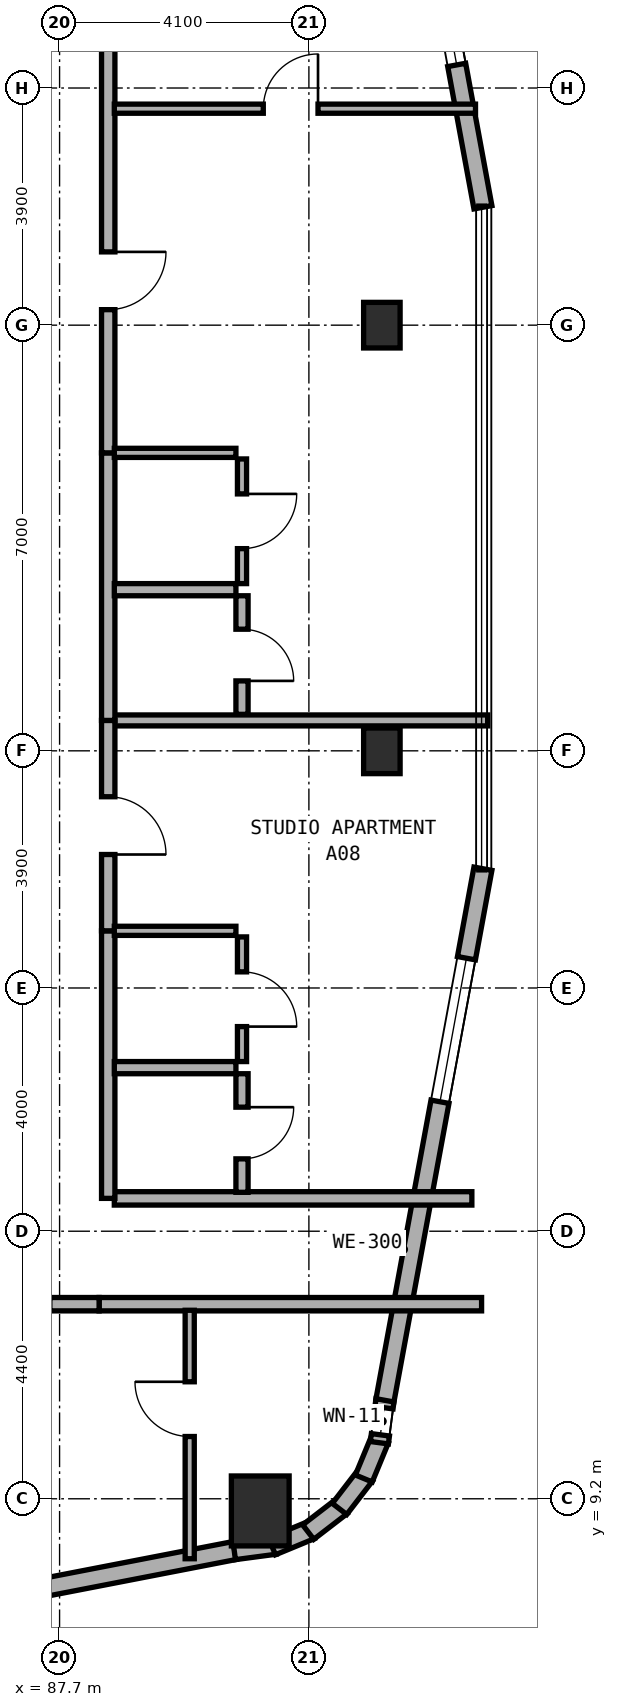
"""IFC4 building model, lengths in metres.
Left out: names, types, materials, properties, quantities, classifications, styles, units other than length and angle.
Written with IfcOpenShell. Run it as: python <this file> out.ifc"""

import sys

from ifc_helpers import new_model, si_unit, direction, frame, frame_2d, origin, origin_2d, place, context, subcontext, project, spatial, rectangle, extrude, element, fill, save


model = new_model("IFC4")
c1 = context("Model", 3, precision=1e-05, world=origin(), true_north=direction((0.0, 1.0)))
c2 = subcontext(c1, "Body", "Model", "MODEL_VIEW")
j1 = project(units=[si_unit("LENGTHUNIT", "METRE"), si_unit("PLANEANGLEUNIT", "RADIAN")], contexts=[c1])
p1 = place(None, origin())
s1 = spatial("IfcSite", under=j1, at=p1, CompositionType="ELEMENT")
p2 = place(p1, origin())
s2 = spatial("IfcBuilding", under=s1, at=p2, CompositionType="ELEMENT")
p3 = place(p2, frame((0.0, 0.0, 80.0)))
s3 = spatial("IfcBuildingStorey", under=s2, at=p3, CompositionType="ELEMENT", Elevation=80.0)
for number, where, z_axis, x_axis in (
    (1, (93.0, 21.5, 0.0), (0.0, 0.0, 1.0), (1.0, 0.0, 0.0)),
    (2, (93.0, 28.5, 0.0), (0.0, 0.0, 1.0), (1.0, 0.0, 0.0)),
):
    element("IfcColumn", number, at=place(p3, frame(where, z_axis=z_axis, x_axis=x_axis)), inside=s3, PredefinedType="COLUMN", context=c2, shape_type="SweptSolid", body=[
        extrude(rectangle(XDim=0.6, YDim=0.75, at=origin_2d()), origin(), (0.0, 0.0, 1.0), 3.5),
    ])
p4 = place(p3, frame((91.0, 9.0, 0.0), z_axis=(0.0, 0.0, 1.0), x_axis=(1.0, 0.0, 0.0)))
e3 = element("IfcColumn", 3, at=p4, inside=s3, PredefinedType="COLUMN", context=c2, shape_type="SweptSolid", body=[
    extrude(rectangle(XDim=0.95, YDim=1.15, at=origin_2d()), origin(), (0.0, 0.0, 1.0), 3.5),
])
p5 = place(p3, frame((82.286, 6.742, 0.0), z_axis=(0.0, 0.0, 1.0), x_axis=(0.981734775858, 0.190254644808, 0.0)))
e4 = element("IfcWall", 4, at=p5, inside=s3, PredefinedType="STANDARD", context=c2, shape_type="SweptSolid", body=[
    extrude(rectangle(XDim=8.448, YDim=0.3, at=frame_2d((4.224, 0.0))), origin(), (0.0, 0.0, 1.0), 3.25),
])
p6 = place(p5, frame((2.609, 0.0, 0.8)))
e5 = element("IfcOpeningElement", 5, at=p6, cuts=e4, PredefinedType="OPENING", context=c2, shape_type="SweptSolid", body=[
    extrude(rectangle(XDim=2.4, YDim=1.6, at=frame_2d((1.2, 0.8))), frame((0.0, 0.16, 0.0), z_axis=(0.0, -1.0, 0.0), x_axis=(1.0, 0.0, 0.0)), (0.0, 0.0, 1.0), 0.32),
])
p7 = place(p3, frame((90.572, 8.348, 0.0), z_axis=(0.0, 0.0, 1.0), x_axis=(0.991293937098, 0.131667498923, 0.0)))
e6 = element("IfcWall", 6, at=p7, inside=s3, PredefinedType="STANDARD", context=c2, shape_type="SweptSolid", body=[
    extrude(rectangle(XDim=0.677, YDim=0.3, at=frame_2d((0.338, 0.0))), origin(), (0.0, 0.0, 1.0), 3.25),
])
p8 = place(p3, frame((91.193, 8.418, 0.0), z_axis=(0.0, 0.0, 1.0), x_axis=(0.924042561464, 0.382289608286, 0.0)))
e7 = element("IfcWall", 7, at=p8, inside=s3, PredefinedType="STANDARD", context=c2, shape_type="SweptSolid", body=[
    extrude(rectangle(XDim=0.694, YDim=0.3, at=frame_2d((0.347, 0.0))), origin(), (0.0, 0.0, 1.0), 3.25),
])
for number, where, z_axis, x_axis in (
    (8, (91.789, 8.652, 0.0), (0.0, 0.0, 1.0), (0.793, 0.609, 0.0)),
    (9, (92.304, 9.033, 0.0), (0.0, 0.0, 1.0), (0.61, 0.793, 0.0)),
    (10, (92.703, 9.534, 0.0), (0.0, 0.0, 1.0), (0.382, 0.924, 0.0)),
):
    element("IfcWall", number, at=place(p3, frame(where, z_axis=z_axis, x_axis=x_axis)), inside=s3, PredefinedType="STANDARD", context=c2, shape_type="SweptSolid", body=[
        extrude(rectangle(XDim=0.694, YDim=0.3, at=frame_2d((0.347, 0.0))), origin(), (0.0, 0.0, 1.0), 3.25),
    ])
p9 = place(p3, frame((92.959, 10.122, 0.0), z_axis=(0.0, 0.0, 1.0), x_axis=(0.130658543777, 0.991427427974, 0.0)))
e11 = element("IfcWall", 11, at=p9, inside=s3, PredefinedType="STANDARD", context=c2, shape_type="SweptSolid", body=[
    extrude(rectangle(XDim=0.712, YDim=0.3, at=frame_2d((0.356, 0.0))), origin(), (0.0, 0.0, 1.0), 3.25),
])
p10 = place(p9, frame((0.131, 0.0, 0.85)))
e12 = element("IfcOpeningElement", 12, at=p10, cuts=e11, PredefinedType="OPENING", context=c2, shape_type="SweptSolid", body=[
    extrude(rectangle(XDim=0.45, YDim=1.5, at=frame_2d((0.225, 0.75))), frame((0.0, 0.16, 0.0), z_axis=(0.0, -1.0, 0.0), x_axis=(1.0, 0.0, 0.0)), (0.0, 0.0, 1.0), 0.32),
])
p11 = place(p3, frame((93.051, 10.819, 0.0), z_axis=(0.0, 0.0, 1.0), x_axis=(0.181241420611, 0.983438634311, 0.0)))
e13 = element("IfcWall", 13, at=p11, inside=s3, PredefinedType="STANDARD", context=c2, shape_type="SweptSolid", body=[
    extrude(rectangle(XDim=8.889, YDim=0.3, at=frame_2d((4.445, 0.0))), origin(), (0.0, 0.0, 1.0), 3.25),
])
p12 = place(p11, frame((4.993, 0.0, 0.8)))
e14 = element("IfcOpeningElement", 14, at=p12, cuts=e13, PredefinedType="OPENING", context=c2, shape_type="SweptSolid", body=[
    extrude(rectangle(XDim=2.4, YDim=1.6, at=frame_2d((1.2, 0.8))), frame((0.0, 0.16, 0.0), z_axis=(0.0, -1.0, 0.0), x_axis=(1.0, 0.0, 0.0)), (0.0, 0.0, 1.0), 0.32),
])
p13 = place(p3, frame((94.662, 30.439, 0.0), z_axis=(0.0, 0.0, 1.0), x_axis=(-0.181241420611, 0.983438634311, 0.0)))
e15 = element("IfcWall", 15, at=p13, inside=s3, PredefinedType="STANDARD", context=c2, shape_type="SweptSolid", body=[
    extrude(rectangle(XDim=8.889, YDim=0.3, at=frame_2d((4.445, 0.0))), origin(), (0.0, 0.0, 1.0), 3.25),
])
p14 = place(p13, frame((2.38, 0.0, 0.8)))
e16 = element("IfcOpeningElement", 16, at=p14, cuts=e15, PredefinedType="OPENING", context=c2, shape_type="SweptSolid", body=[
    extrude(rectangle(XDim=2.4, YDim=1.6, at=frame_2d((1.2, 0.8))), frame((0.0, 0.16, 0.0), z_axis=(0.0, -1.0, 0.0), x_axis=(1.0, 0.0, 0.0)), (0.0, 0.0, 1.0), 0.32),
])
p15 = place(p3, frame((88.35, 12.4, 0.0), z_axis=(0.0, 0.0, 1.0), x_axis=(1.0, 0.0, 0.0)))
e17 = element("IfcWall", 17, at=p15, inside=s3, PredefinedType="SOLIDWALL", context=c2, shape_type="SweptSolid", body=[
    extrude(rectangle(XDim=6.29, YDim=0.22, at=frame_2d((3.145, 0.0))), origin(), (0.0, 0.0, 1.0), 2.945),
])
p16 = place(p3, frame((85.78, 12.4, 0.0), z_axis=(0.0, 0.0, 1.0), x_axis=(1.0, 0.0, 0.0)))
e18 = element("IfcWall", 18, at=p16, inside=s3, PredefinedType="SOLIDWALL", context=c2, shape_type="SweptSolid", body=[
    extrude(rectangle(XDim=2.57, YDim=0.22, at=frame_2d((1.285, 0.0))), origin(), (0.0, 0.0, 1.0), 3.22),
])
p17 = place(p16, frame((0.81, 0.0, 0.0)))
e19 = element("IfcOpeningElement", 19, at=p17, cuts=e18, PredefinedType="OPENING", context=c2, shape_type="SweptSolid", body=[
    extrude(rectangle(XDim=0.95, YDim=2.1, at=frame_2d((0.475, 1.05))), frame((0.0, 0.12, 0.0), z_axis=(0.0, -1.0, 0.0), x_axis=(1.0, 0.0, 0.0)), (0.0, 0.0, 1.0), 0.24),
])
p18 = place(p3, frame((89.84, 8.214, 0.0), z_axis=(0.0, 0.0, 1.0), x_axis=(0.0, 1.0, 0.0)))
e20 = element("IfcWall", 20, at=p18, inside=s3, PredefinedType="PARTITIONING", context=c2, shape_type="SweptSolid", body=[
    extrude(rectangle(XDim=4.086, YDim=0.15, at=frame_2d((2.043, 0.0))), origin(), (0.0, 0.0, 1.0), 2.945),
])
p19 = place(p18, frame((2.01, 0.0, 0.0)))
e21 = element("IfcOpeningElement", 21, at=p19, cuts=e20, PredefinedType="OPENING", context=c2, shape_type="SweptSolid", body=[
    extrude(rectangle(XDim=0.9, YDim=2.1, at=frame_2d((0.45, 1.05))), frame((0.0, 0.085, 0.0), z_axis=(0.0, -1.0, 0.0), x_axis=(1.0, 0.0, 0.0)), (0.0, 0.0, 1.0), 0.17),
])
p20 = place(p3, frame((88.6, 14.14, 0.0), z_axis=(0.0, 0.0, 1.0), x_axis=(1.0, 0.0, 0.0)))
e22 = element("IfcWall", 22, at=p20, inside=s3, PredefinedType="SOLIDWALL", context=c2, shape_type="SweptSolid", body=[
    extrude(rectangle(XDim=5.88, YDim=0.22, at=frame_2d((2.94, 0.0))), origin(), (0.0, 0.0, 1.0), 2.945),
])
p21 = place(p3, frame((88.5, 22.0, 0.0), z_axis=(0.0, 0.0, 1.0), x_axis=(1.0, 0.0, 0.0)))
e23 = element("IfcWall", 23, at=p21, inside=s3, PredefinedType="SOLIDWALL", context=c2, shape_type="SweptSolid", body=[
    extrude(rectangle(XDim=6.24, YDim=0.18, at=frame_2d((3.12, 0.0))), origin(), (0.0, 0.0, 1.0), 2.945),
])
p22 = place(p3, frame((88.5, 14.14, 0.0), z_axis=(0.0, 0.0, 1.0), x_axis=(0.0, 1.0, 0.0)))
e24 = element("IfcWall", 24, at=p22, inside=s3, PredefinedType="SOLIDWALL", context=c2, shape_type="SweptSolid", body=[
    extrude(rectangle(XDim=4.4, YDim=0.22, at=frame_2d((2.2, 0.0))), origin(), (0.0, 0.0, 1.0), 3.22),
])
p23 = place(p3, frame((88.5, 18.54, 0.0), z_axis=(0.0, 0.0, 1.0), x_axis=(0.0, 1.0, 0.0)))
e25 = element("IfcWall", 25, at=p23, inside=s3, PredefinedType="SOLIDWALL", context=c2, shape_type="SweptSolid", body=[
    extrude(rectangle(XDim=3.46, YDim=0.22, at=frame_2d((1.73, 0.0))), origin(), (0.0, 0.0, 1.0), 2.825),
])
p24 = place(p23, frame((1.255, 0.0, 0.0)))
e26 = element("IfcOpeningElement", 26, at=p24, cuts=e25, PredefinedType="OPENING", context=c2, shape_type="SweptSolid", body=[
    extrude(rectangle(XDim=0.95, YDim=2.1, at=frame_2d((0.475, 1.05))), frame((0.0, 0.12, 0.0), z_axis=(0.0, -1.0, 0.0), x_axis=(1.0, 0.0, 0.0)), (0.0, 0.0, 1.0), 0.24),
])
p25 = place(p3, frame((88.6, 16.29, 0.0), z_axis=(0.0, 0.0, 1.0), x_axis=(1.0, 0.0, 0.0)))
e27 = element("IfcWall", 27, at=p25, inside=s3, PredefinedType="PLUMBINGWALL", context=c2, shape_type="SweptSolid", body=[
    extrude(rectangle(XDim=2.0, YDim=0.2, at=frame_2d((1.0, 0.0))), origin(), (0.0, 0.0, 1.0), 3.22),
])
p26 = place(p3, frame((88.6, 18.54, 0.0), z_axis=(0.0, 0.0, 1.0), x_axis=(1.0, 0.0, 0.0)))
e28 = element("IfcWall", 28, at=p26, inside=s3, PredefinedType="PARTITIONING", context=c2, shape_type="SweptSolid", body=[
    extrude(rectangle(XDim=2.0, YDim=0.15, at=frame_2d((1.0, 0.0))), origin(), (0.0, 0.0, 1.0), 3.22),
])
p27 = place(p3, frame((90.7, 14.24, 0.0), z_axis=(0.0, 0.0, 1.0), x_axis=(0.0, 1.0, 0.0)))
e29 = element("IfcWall", 29, at=p27, inside=s3, PredefinedType="PLUMBINGWALL", context=c2, shape_type="SweptSolid", body=[
    extrude(rectangle(XDim=1.95, YDim=0.2, at=frame_2d((0.975, 0.0))), origin(), (0.0, 0.0, 1.0), 3.22),
])
p28 = place(p27, frame((0.55, 0.0, 0.0)))
e30 = element("IfcOpeningElement", 30, at=p28, cuts=e29, PredefinedType="OPENING", context=c2, shape_type="SweptSolid", body=[
    extrude(rectangle(XDim=0.85, YDim=2.1, at=frame_2d((0.425, 1.05))), frame((0.0, 0.11, 0.0), z_axis=(0.0, -1.0, 0.0), x_axis=(1.0, 0.0, 0.0)), (0.0, 0.0, 1.0), 0.22),
])
p29 = place(p3, frame((90.7, 16.39, 0.0), z_axis=(0.0, 0.0, 1.0), x_axis=(0.0, 1.0, 0.0)))
e31 = element("IfcWall", 31, at=p29, inside=s3, PredefinedType="PARTITIONING", context=c2, shape_type="SweptSolid", body=[
    extrude(rectangle(XDim=2.05, YDim=0.15, at=frame_2d((1.025, 0.0))), origin(), (0.0, 0.0, 1.0), 3.22),
])
p30 = place(p29, frame((0.575, 0.0, 0.0)))
e32 = element("IfcOpeningElement", 32, at=p30, cuts=e31, PredefinedType="OPENING", context=c2, shape_type="SweptSolid", body=[
    extrude(rectangle(XDim=0.9, YDim=2.1, at=frame_2d((0.45, 1.05))), frame((0.0, 0.085, 0.0), z_axis=(0.0, -1.0, 0.0), x_axis=(1.0, 0.0, 0.0)), (0.0, 0.0, 1.0), 0.17),
])
p31 = place(p3, frame((88.5, 22.0, 0.0), z_axis=(0.0, 0.0, 1.0), x_axis=(0.0, 1.0, 0.0)))
e33 = element("IfcWall", 33, at=p31, inside=s3, PredefinedType="SOLIDWALL", context=c2, shape_type="SweptSolid", body=[
    extrude(rectangle(XDim=4.4, YDim=0.22, at=frame_2d((2.2, 0.0))), origin(), (0.0, 0.0, 1.0), 3.22),
])
p32 = place(p3, frame((88.5, 26.4, 0.0), z_axis=(0.0, 0.0, 1.0), x_axis=(0.0, 1.0, 0.0)))
e34 = element("IfcWall", 34, at=p32, inside=s3, PredefinedType="SOLIDWALL", context=c2, shape_type="SweptSolid", body=[
    extrude(rectangle(XDim=9.46, YDim=0.22, at=frame_2d((4.73, 0.0))), origin(), (0.0, 0.0, 1.0), 2.825),
])
p33 = place(p32, frame((2.355, 0.0, 0.0)))
e35 = element("IfcOpeningElement", 35, at=p33, cuts=e34, PredefinedType="OPENING", context=c2, shape_type="SweptSolid", body=[
    extrude(rectangle(XDim=0.95, YDim=2.1, at=frame_2d((0.475, 1.05))), frame((0.0, 0.12, 0.0), z_axis=(0.0, -1.0, 0.0), x_axis=(1.0, 0.0, 0.0)), (0.0, 0.0, 1.0), 0.24),
])
p34 = place(p3, frame((88.6, 32.06, 0.0), z_axis=(0.0, 0.0, 1.0), x_axis=(1.0, 0.0, 0.0)))
e36 = element("IfcWall", 36, at=p34, inside=s3, PredefinedType="PARTITIONING", context=c2, shape_type="SweptSolid", body=[
    extrude(rectangle(XDim=5.94, YDim=0.15, at=frame_2d((2.97, 0.0))), origin(), (0.0, 0.0, 1.0), 2.945),
])
p35 = place(p34, frame((2.45, 0.0, 0.0)))
e37 = element("IfcOpeningElement", 37, at=p35, cuts=e36, PredefinedType="OPENING", context=c2, shape_type="SweptSolid", body=[
    extrude(rectangle(XDim=0.9, YDim=2.1, at=frame_2d((0.45, 1.05))), frame((0.0, 0.085, 0.0), z_axis=(0.0, -1.0, 0.0), x_axis=(1.0, 0.0, 0.0)), (0.0, 0.0, 1.0), 0.17),
])
p36 = place(p3, frame((88.6, 24.15, 0.0), z_axis=(0.0, 0.0, 1.0), x_axis=(1.0, 0.0, 0.0)))
e38 = element("IfcWall", 38, at=p36, inside=s3, PredefinedType="PLUMBINGWALL", context=c2, shape_type="SweptSolid", body=[
    extrude(rectangle(XDim=2.0, YDim=0.2, at=frame_2d((1.0, 0.0))), origin(), (0.0, 0.0, 1.0), 3.22),
])
p37 = place(p3, frame((88.6, 26.4, 0.0), z_axis=(0.0, 0.0, 1.0), x_axis=(1.0, 0.0, 0.0)))
e39 = element("IfcWall", 39, at=p37, inside=s3, PredefinedType="PARTITIONING", context=c2, shape_type="SweptSolid", body=[
    extrude(rectangle(XDim=2.0, YDim=0.15, at=frame_2d((1.0, 0.0))), origin(), (0.0, 0.0, 1.0), 3.22),
])
p38 = place(p3, frame((90.7, 22.1, 0.0), z_axis=(0.0, 0.0, 1.0), x_axis=(0.0, 1.0, 0.0)))
e40 = element("IfcWall", 40, at=p38, inside=s3, PredefinedType="PLUMBINGWALL", context=c2, shape_type="SweptSolid", body=[
    extrude(rectangle(XDim=1.95, YDim=0.2, at=frame_2d((0.975, 0.0))), origin(), (0.0, 0.0, 1.0), 3.22),
])
p39 = place(p38, frame((0.55, 0.0, 0.0)))
e41 = element("IfcOpeningElement", 41, at=p39, cuts=e40, PredefinedType="OPENING", context=c2, shape_type="SweptSolid", body=[
    extrude(rectangle(XDim=0.85, YDim=2.1, at=frame_2d((0.425, 1.05))), frame((0.0, 0.11, 0.0), z_axis=(0.0, -1.0, 0.0), x_axis=(1.0, 0.0, 0.0)), (0.0, 0.0, 1.0), 0.22),
])
p40 = place(p3, frame((90.7, 24.25, 0.0), z_axis=(0.0, 0.0, 1.0), x_axis=(0.0, 1.0, 0.0)))
e42 = element("IfcWall", 42, at=p40, inside=s3, PredefinedType="PARTITIONING", context=c2, shape_type="SweptSolid", body=[
    extrude(rectangle(XDim=2.05, YDim=0.15, at=frame_2d((1.025, 0.0))), origin(), (0.0, 0.0, 1.0), 3.22),
])
p41 = place(p40, frame((0.575, 0.0, 0.0)))
e43 = element("IfcOpeningElement", 43, at=p41, cuts=e42, PredefinedType="OPENING", context=c2, shape_type="SweptSolid", body=[
    extrude(rectangle(XDim=0.9, YDim=2.1, at=frame_2d((0.45, 1.05))), frame((0.0, 0.085, 0.0), z_axis=(0.0, -1.0, 0.0), x_axis=(1.0, 0.0, 0.0)), (0.0, 0.0, 1.0), 0.17),
])
p42 = place(p12, origin())
e44 = element("IfcWindow", 44, at=p42, inside=s3, PartitioningType="SINGLE_PANEL", PredefinedType="WINDOW", context=c2, shape_type="SweptSolid", body=[
    extrude(rectangle(XDim=2.4, YDim=1.6, at=frame_2d((1.2, 0.8))), frame((0.0, 0.03, 0.0), z_axis=(0.0, -1.0, 0.0), x_axis=(1.0, 0.0, 0.0)), (0.0, 0.0, 1.0), 0.06),
])
fill(e14, e44)
p43 = place(p14, origin())
e45 = element("IfcWindow", 45, at=p43, inside=s3, PartitioningType="SINGLE_PANEL", PredefinedType="WINDOW", context=c2, shape_type="SweptSolid", body=[
    extrude(rectangle(XDim=2.4, YDim=1.6, at=frame_2d((1.2, 0.8))), frame((0.0, 0.03, 0.0), z_axis=(0.0, -1.0, 0.0), x_axis=(1.0, 0.0, 0.0)), (0.0, 0.0, 1.0), 0.06),
])
fill(e16, e45)
p44 = place(p10, origin())
e46 = element("IfcWindow", 46, at=p44, inside=s3, PartitioningType="SINGLE_PANEL", PredefinedType="WINDOW", context=c2, shape_type="SweptSolid", body=[
    extrude(rectangle(XDim=0.45, YDim=1.5, at=frame_2d((0.225, 0.75))), frame((0.0, 0.03, 0.0), z_axis=(0.0, -1.0, 0.0), x_axis=(1.0, 0.0, 0.0)), (0.0, 0.0, 1.0), 0.06),
])
fill(e12, e46)
p45 = place(p19, origin())
e47 = element("IfcDoor", 47, at=p45, inside=s3, OperationType="SINGLE_SWING_RIGHT", PredefinedType="DOOR", context=c2, shape_type="SweptSolid", body=[
    extrude(rectangle(XDim=0.9, YDim=2.1, at=frame_2d((0.45, 1.05))), frame((0.0, 0.025, 0.0), z_axis=(0.0, -1.0, 0.0), x_axis=(1.0, 0.0, 0.0)), (0.0, 0.0, 1.0), 0.05),
])
fill(e21, e47)
p46 = place(p24, frame((0.95, 0.0, 0.0), z_axis=(0.0, 0.0, 1.0), x_axis=(-1.0, 0.0, 0.0)))
e48 = element("IfcDoor", 48, at=p46, inside=s3, OperationType="SINGLE_SWING_RIGHT", PredefinedType="DOOR", context=c2, shape_type="SweptSolid", body=[
    extrude(rectangle(XDim=0.95, YDim=2.1, at=frame_2d((0.475, 1.05))), frame((0.0, 0.025, 0.0), z_axis=(0.0, -1.0, 0.0), x_axis=(1.0, 0.0, 0.0)), (0.0, 0.0, 1.0), 0.05),
])
fill(e26, e48)
p47 = place(p28, frame((0.85, 0.0, 0.0), z_axis=(0.0, 0.0, 1.0), x_axis=(-1.0, 0.0, 0.0)))
e49 = element("IfcDoor", 49, at=p47, inside=s3, OperationType="SINGLE_SWING_LEFT", PredefinedType="DOOR", context=c2, shape_type="SweptSolid", body=[
    extrude(rectangle(XDim=0.85, YDim=2.1, at=frame_2d((0.425, 1.05))), frame((0.0, 0.025, 0.0), z_axis=(0.0, -1.0, 0.0), x_axis=(1.0, 0.0, 0.0)), (0.0, 0.0, 1.0), 0.05),
])
fill(e30, e49)
p48 = place(p30, frame((0.9, 0.0, 0.0), z_axis=(0.0, 0.0, 1.0), x_axis=(-1.0, 0.0, 0.0)))
e50 = element("IfcDoor", 50, at=p48, inside=s3, OperationType="SINGLE_SWING_RIGHT", PredefinedType="DOOR", context=c2, shape_type="SweptSolid", body=[
    extrude(rectangle(XDim=0.9, YDim=2.1, at=frame_2d((0.45, 1.05))), frame((0.0, 0.025, 0.0), z_axis=(0.0, -1.0, 0.0), x_axis=(1.0, 0.0, 0.0)), (0.0, 0.0, 1.0), 0.05),
])
fill(e32, e50)
p49 = place(p33, frame((0.95, 0.0, 0.0), z_axis=(0.0, 0.0, 1.0), x_axis=(-1.0, 0.0, 0.0)))
e51 = element("IfcDoor", 51, at=p49, inside=s3, OperationType="SINGLE_SWING_LEFT", PredefinedType="DOOR", context=c2, shape_type="SweptSolid", body=[
    extrude(rectangle(XDim=0.95, YDim=2.1, at=frame_2d((0.475, 1.05))), frame((0.0, 0.025, 0.0), z_axis=(0.0, -1.0, 0.0), x_axis=(1.0, 0.0, 0.0)), (0.0, 0.0, 1.0), 0.05),
])
fill(e35, e51)
p50 = place(p35, origin())
e52 = element("IfcDoor", 52, at=p50, inside=s3, OperationType="SINGLE_SWING_RIGHT", PredefinedType="DOOR", context=c2, shape_type="SweptSolid", body=[
    extrude(rectangle(XDim=0.9, YDim=2.1, at=frame_2d((0.45, 1.05))), frame((0.0, 0.025, 0.0), z_axis=(0.0, -1.0, 0.0), x_axis=(1.0, 0.0, 0.0)), (0.0, 0.0, 1.0), 0.05),
])
fill(e37, e52)
p51 = place(p39, frame((0.85, 0.0, 0.0), z_axis=(0.0, 0.0, 1.0), x_axis=(-1.0, 0.0, 0.0)))
e53 = element("IfcDoor", 53, at=p51, inside=s3, OperationType="SINGLE_SWING_RIGHT", PredefinedType="DOOR", context=c2, shape_type="SweptSolid", body=[
    extrude(rectangle(XDim=0.85, YDim=2.1, at=frame_2d((0.425, 1.05))), frame((0.0, 0.025, 0.0), z_axis=(0.0, -1.0, 0.0), x_axis=(1.0, 0.0, 0.0)), (0.0, 0.0, 1.0), 0.05),
])
fill(e41, e53)
p52 = place(p41, frame((0.9, 0.0, 0.0), z_axis=(0.0, 0.0, 1.0), x_axis=(-1.0, 0.0, 0.0)))
e54 = element("IfcDoor", 54, at=p52, inside=s3, OperationType="SINGLE_SWING_LEFT", PredefinedType="DOOR", context=c2, shape_type="SweptSolid", body=[
    extrude(rectangle(XDim=0.9, YDim=2.1, at=frame_2d((0.45, 1.05))), frame((0.0, 0.025, 0.0), z_axis=(0.0, -1.0, 0.0), x_axis=(1.0, 0.0, 0.0)), (0.0, 0.0, 1.0), 0.05),
])
fill(e43, e54)
save(model, sys.argv[1])
